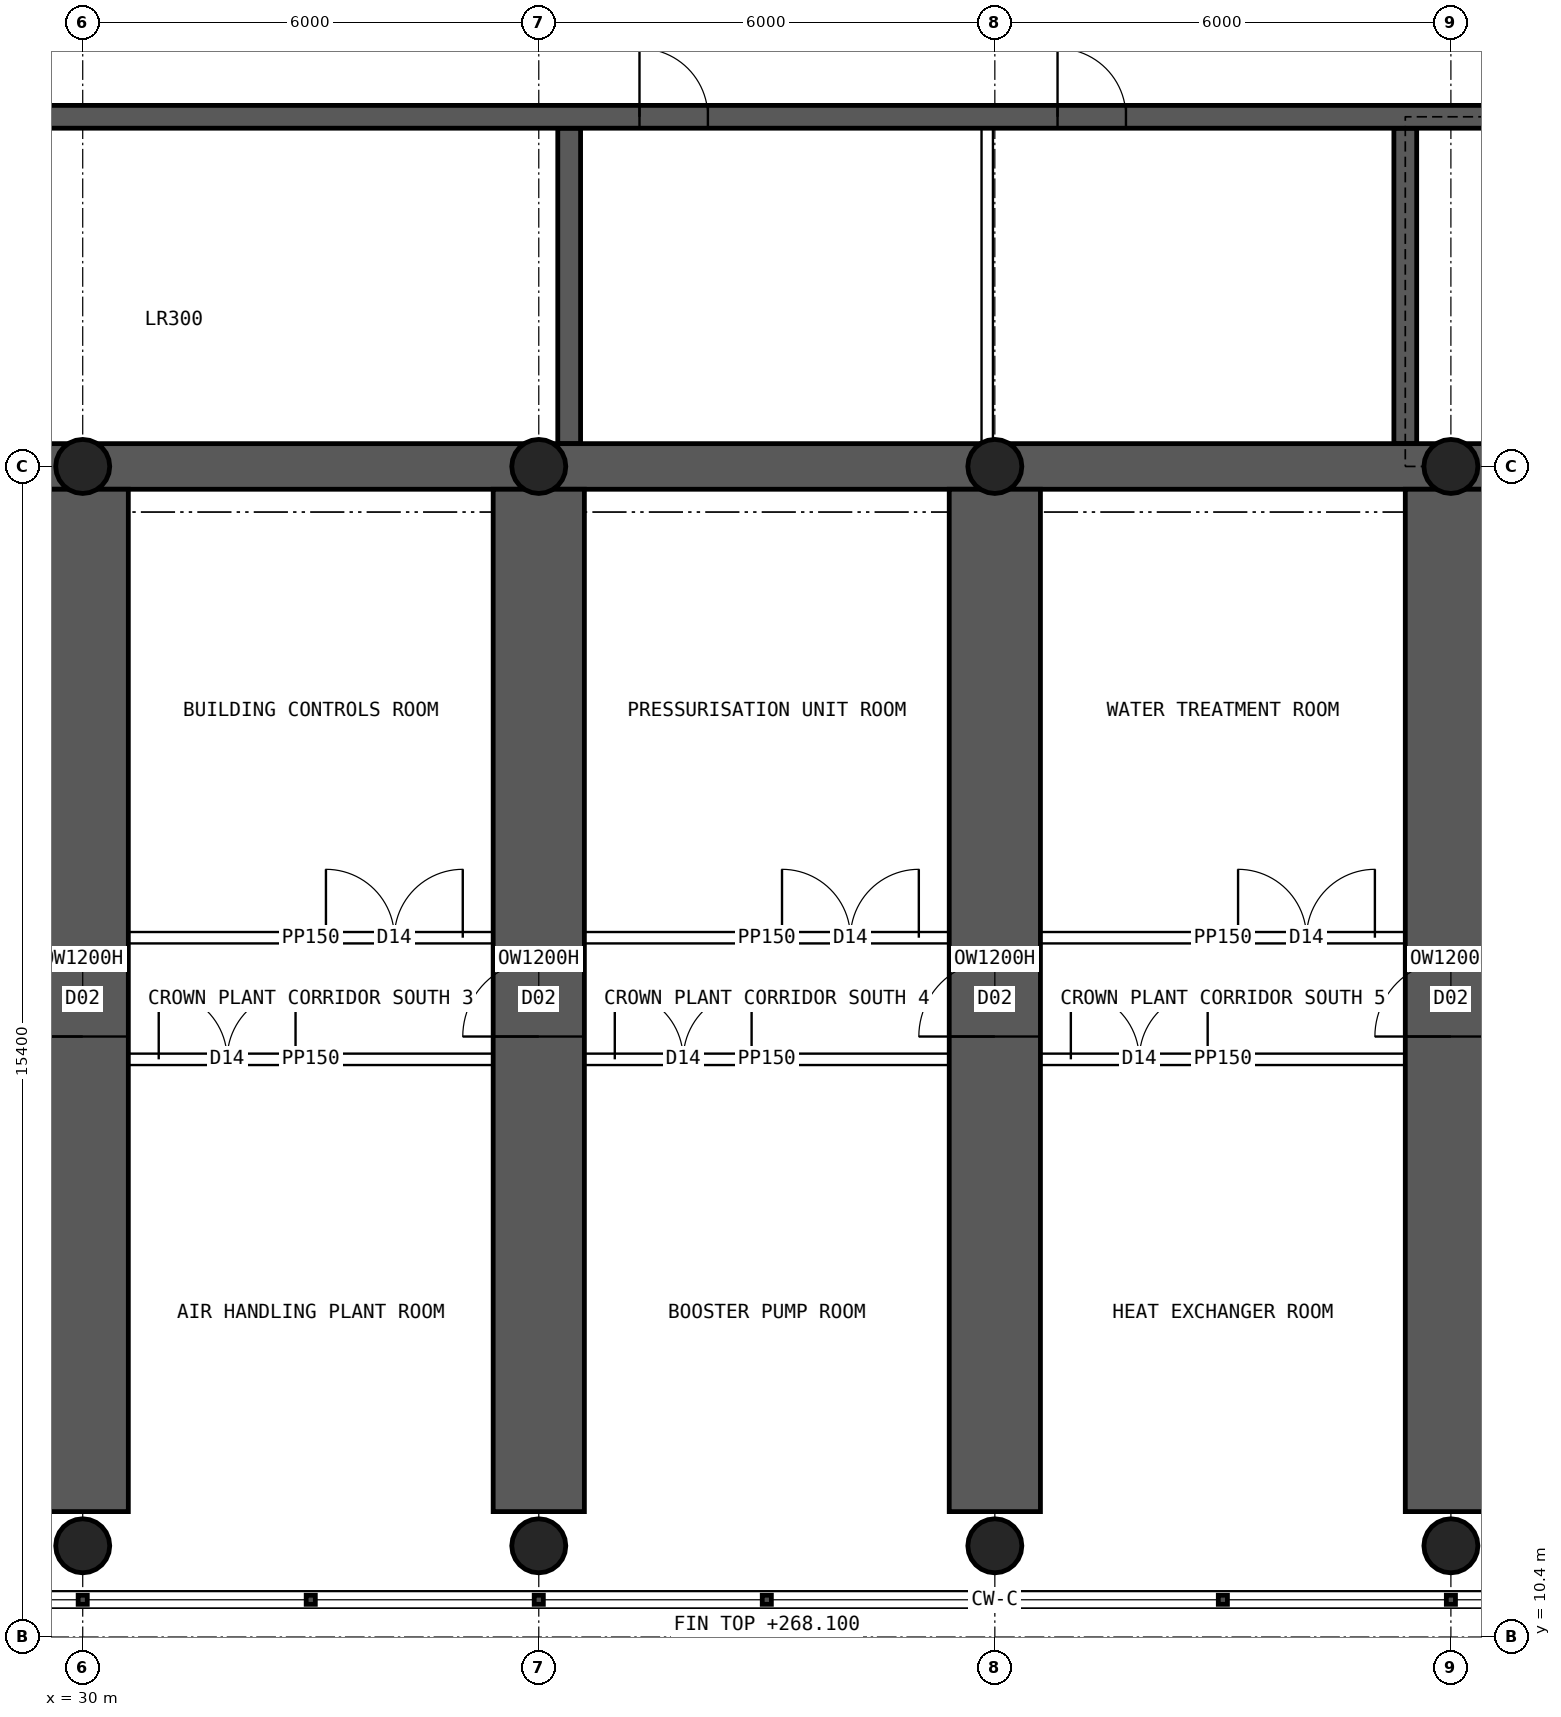
"""IFC4 building model, lengths in metres.
Left out: names, types, materials, properties, quantities, classifications, styles, units other than length and angle.
Written with IfcOpenShell. Run it as: python <this file> out.ifc"""

import sys

from ifc_helpers import new_model, si_unit, direction, frame, frame_2d, origin, origin_2d, place, context, subcontext, project, spatial, rectangle, hollow_circle, extrude, element, fill, save


model = new_model("IFC4")
c1 = context("Model", 3, precision=1e-05, world=origin(), true_north=direction((0.0, 1.0)))
c2 = subcontext(c1, "Body", "Model", "MODEL_VIEW")
j1 = project(units=[si_unit("LENGTHUNIT", "METRE"), si_unit("PLANEANGLEUNIT", "RADIAN")], contexts=[c1])
p1 = place(None, origin())
s1 = spatial("IfcSite", under=j1, at=p1, CompositionType="ELEMENT")
p2 = place(p1, origin())
s2 = spatial("IfcBuilding", under=s1, at=p2, CompositionType="ELEMENT")
p3 = place(p2, frame((0.0, 0.0, 262.3)))
s3 = spatial("IfcBuildingStorey", under=s2, at=p3, CompositionType="ELEMENT", Elevation=262.3)
p4 = place(p3, frame((18.0, 25.8, 0.0), z_axis=(0.0, 0.0, 1.0), x_axis=(1.0, 0.0, 0.0)))
e1 = element("IfcWall", 1, at=p4, inside=s3, PredefinedType="SHEAR", context=c2, shape_type="SweptSolid", body=[
    extrude(rectangle(XDim=48.0, YDim=0.6, at=frame_2d((24.0, 0.0))), origin(), (0.0, 0.0, 1.0), 6.0),
])
p5 = place(p3, frame((18.3, 30.4, 0.0), z_axis=(0.0, 0.0, 1.0), x_axis=(1.0, 0.0, 0.0)))
e2 = element("IfcWall", 2, at=p5, inside=s3, PredefinedType="SHEAR", context=c2, shape_type="SweptSolid", body=[
    extrude(rectangle(XDim=47.4, YDim=0.3, at=frame_2d((23.7, 0.0))), origin(), (0.0, 0.0, 1.0), 6.0),
])
p6 = place(p5, frame((0.4, 0.0, 0.0)))
e3 = element("IfcOpeningElement", 3, at=p6, cuts=e2, PredefinedType="OPENING", context=c2, shape_type="SweptSolid", body=[
    extrude(rectangle(XDim=1.0, YDim=2.1, at=frame_2d((0.5, 1.05))), frame((0.0, 0.16, 0.0), z_axis=(0.0, -1.0, 0.0), x_axis=(1.0, 0.0, 0.0)), (0.0, 0.0, 1.0), 0.32),
])
p7 = place(p5, frame((46.0, 0.0, 0.0)))
e4 = element("IfcOpeningElement", 4, at=p7, cuts=e2, PredefinedType="OPENING", context=c2, shape_type="SweptSolid", body=[
    extrude(rectangle(XDim=1.0, YDim=2.1, at=frame_2d((0.5, 1.05))), frame((0.0, 0.16, 0.0), z_axis=(0.0, -1.0, 0.0), x_axis=(1.0, 0.0, 0.0)), (0.0, 0.0, 1.0), 0.32),
])
p8 = place(p5, frame((19.025, 0.0, 0.0)))
e5 = element("IfcOpeningElement", 5, at=p8, cuts=e2, PredefinedType="OPENING", context=c2, shape_type="SweptSolid", body=[
    extrude(rectangle(XDim=0.9, YDim=2.1, at=frame_2d((0.45, 1.05))), frame((0.0, 0.16, 0.0), z_axis=(0.0, -1.0, 0.0), x_axis=(1.0, 0.0, 0.0)), (0.0, 0.0, 1.0), 0.32),
])
p9 = place(p5, frame((24.525, 0.0, 0.0)))
e6 = element("IfcOpeningElement", 6, at=p9, cuts=e2, PredefinedType="OPENING", context=c2, shape_type="SweptSolid", body=[
    extrude(rectangle(XDim=0.9, YDim=2.1, at=frame_2d((0.45, 1.05))), frame((0.0, 0.16, 0.0), z_axis=(0.0, -1.0, 0.0), x_axis=(1.0, 0.0, 0.0)), (0.0, 0.0, 1.0), 0.32),
])
p10 = place(p5, frame((30.317, 0.0, 0.0)))
e7 = element("IfcOpeningElement", 7, at=p10, cuts=e2, PredefinedType="OPENING", context=c2, shape_type="SweptSolid", body=[
    extrude(rectangle(XDim=1.1, YDim=2.1, at=frame_2d((0.55, 1.05))), frame((0.0, 0.16, 0.0), z_axis=(0.0, -1.0, 0.0), x_axis=(1.0, 0.0, 0.0)), (0.0, 0.0, 1.0), 0.32),
])
p11 = place(p5, frame((33.85, 0.0, 0.0)))
e8 = element("IfcOpeningElement", 8, at=p11, cuts=e2, PredefinedType="OPENING", context=c2, shape_type="SweptSolid", body=[
    extrude(rectangle(XDim=1.1, YDim=2.1, at=frame_2d((0.55, 1.05))), frame((0.0, 0.16, 0.0), z_axis=(0.0, -1.0, 0.0), x_axis=(1.0, 0.0, 0.0)), (0.0, 0.0, 1.0), 0.32),
])
p12 = place(p5, frame((37.383, 0.0, 0.0)))
e9 = element("IfcOpeningElement", 9, at=p12, cuts=e2, PredefinedType="OPENING", context=c2, shape_type="SweptSolid", body=[
    extrude(rectangle(XDim=1.1, YDim=2.1, at=frame_2d((0.55, 1.05))), frame((0.0, 0.16, 0.0), z_axis=(0.0, -1.0, 0.0), x_axis=(1.0, 0.0, 0.0)), (0.0, 0.0, 1.0), 0.32),
])
for number, where, z_axis, x_axis in (
    (10, (36.4, 26.1, 0.0), (0.0, 0.0, 1.0), (0.0, 1.0, 0.0)),
    (11, (47.4, 26.1, 0.0), (0.0, 0.0, 1.0), (0.0, 1.0, 0.0)),
):
    element("IfcWall", number, at=place(p3, frame(where, z_axis=z_axis, x_axis=x_axis)), inside=s3, PredefinedType="SHEAR", context=c2, shape_type="SweptSolid", body=[
        extrude(rectangle(XDim=4.15, YDim=0.3, at=frame_2d((2.075, 0.0))), origin(), (0.0, 0.0, 1.0), 6.0),
    ])
p13 = place(p3, frame((30.0, 12.05, 0.0), z_axis=(0.0, 0.0, 1.0), x_axis=(0.0, 1.0, 0.0)))
e12 = element("IfcWall", 12, at=p13, inside=s3, PredefinedType="SHEAR", context=c2, shape_type="SweptSolid", body=[
    extrude(rectangle(XDim=13.45, YDim=1.2, at=frame_2d((6.725, 0.0))), origin(), (0.0, 0.0, 1.0), 4.4),
])
p14 = place(p13, frame((6.25, 0.0, 0.0)))
e13 = element("IfcOpeningElement", 13, at=p14, cuts=e12, PredefinedType="OPENING", context=c2, shape_type="SweptSolid", body=[
    extrude(rectangle(XDim=1.0, YDim=2.1, at=frame_2d((0.5, 1.05))), frame((0.0, 0.61, 0.0), z_axis=(0.0, -1.0, 0.0), x_axis=(1.0, 0.0, 0.0)), (0.0, 0.0, 1.0), 1.22),
])
p15 = place(p3, frame((36.0, 12.05, 0.0), z_axis=(0.0, 0.0, 1.0), x_axis=(0.0, 1.0, 0.0)))
e14 = element("IfcWall", 14, at=p15, inside=s3, PredefinedType="SHEAR", context=c2, shape_type="SweptSolid", body=[
    extrude(rectangle(XDim=13.45, YDim=1.2, at=frame_2d((6.725, 0.0))), origin(), (0.0, 0.0, 1.0), 4.4),
])
p16 = place(p15, frame((6.25, 0.0, 0.0)))
e15 = element("IfcOpeningElement", 15, at=p16, cuts=e14, PredefinedType="OPENING", context=c2, shape_type="SweptSolid", body=[
    extrude(rectangle(XDim=1.0, YDim=2.1, at=frame_2d((0.5, 1.05))), frame((0.0, 0.61, 0.0), z_axis=(0.0, -1.0, 0.0), x_axis=(1.0, 0.0, 0.0)), (0.0, 0.0, 1.0), 1.22),
])
p17 = place(p3, frame((42.0, 12.05, 0.0), z_axis=(0.0, 0.0, 1.0), x_axis=(0.0, 1.0, 0.0)))
e16 = element("IfcWall", 16, at=p17, inside=s3, PredefinedType="SHEAR", context=c2, shape_type="SweptSolid", body=[
    extrude(rectangle(XDim=13.45, YDim=1.2, at=frame_2d((6.725, 0.0))), origin(), (0.0, 0.0, 1.0), 4.4),
])
p18 = place(p17, frame((6.25, 0.0, 0.0)))
e17 = element("IfcOpeningElement", 17, at=p18, cuts=e16, PredefinedType="OPENING", context=c2, shape_type="SweptSolid", body=[
    extrude(rectangle(XDim=1.0, YDim=2.1, at=frame_2d((0.5, 1.05))), frame((0.0, 0.61, 0.0), z_axis=(0.0, -1.0, 0.0), x_axis=(1.0, 0.0, 0.0)), (0.0, 0.0, 1.0), 1.22),
])
p19 = place(p3, frame((48.0, 12.05, 0.0), z_axis=(0.0, 0.0, 1.0), x_axis=(0.0, 1.0, 0.0)))
e18 = element("IfcWall", 18, at=p19, inside=s3, PredefinedType="SHEAR", context=c2, shape_type="SweptSolid", body=[
    extrude(rectangle(XDim=13.45, YDim=1.2, at=frame_2d((6.725, 0.0))), origin(), (0.0, 0.0, 1.0), 4.4),
])
p20 = place(p19, frame((6.25, 0.0, 0.0)))
e19 = element("IfcOpeningElement", 19, at=p20, cuts=e18, PredefinedType="OPENING", context=c2, shape_type="SweptSolid", body=[
    extrude(rectangle(XDim=1.0, YDim=2.1, at=frame_2d((0.5, 1.05))), frame((0.0, 0.61, 0.0), z_axis=(0.0, -1.0, 0.0), x_axis=(1.0, 0.0, 0.0)), (0.0, 0.0, 1.0), 1.22),
])
p21 = place(p3, frame((30.0, 11.6, 0.0), z_axis=(0.0, 0.0, 1.0), x_axis=(1.0, 0.0, 0.0)))
e20 = element("IfcColumn", 20, at=p21, inside=s3, PredefinedType="COLUMN", context=c2, shape_type="SweptSolid", body=[
    extrude(hollow_circle(Radius=0.355, WallThickness=0.025, at=origin_2d()), origin(), (0.0, 0.0, 1.0), 4.885),
])
p22 = place(p3, frame((30.0, 25.8, 0.0), z_axis=(0.0, 0.0, 1.0), x_axis=(1.0, 0.0, 0.0)))
e21 = element("IfcColumn", 21, at=p22, inside=s3, PredefinedType="COLUMN", context=c2, shape_type="SweptSolid", body=[
    extrude(hollow_circle(Radius=0.355, WallThickness=0.025, at=origin_2d()), origin(), (0.0, 0.0, 1.0), 8.426),
])
p23 = place(p3, frame((36.0, 11.6, 0.0), z_axis=(0.0, 0.0, 1.0), x_axis=(1.0, 0.0, 0.0)))
e22 = element("IfcColumn", 22, at=p23, inside=s3, PredefinedType="COLUMN", context=c2, shape_type="SweptSolid", body=[
    extrude(hollow_circle(Radius=0.355, WallThickness=0.025, at=origin_2d()), origin(), (0.0, 0.0, 1.0), 4.885),
])
p24 = place(p3, frame((36.0, 25.8, 0.0), z_axis=(0.0, 0.0, 1.0), x_axis=(1.0, 0.0, 0.0)))
e23 = element("IfcColumn", 23, at=p24, inside=s3, PredefinedType="COLUMN", context=c2, shape_type="SweptSolid", body=[
    extrude(hollow_circle(Radius=0.355, WallThickness=0.025, at=origin_2d()), origin(), (0.0, 0.0, 1.0), 8.426),
])
p25 = place(p3, frame((42.0, 11.6, 0.0), z_axis=(0.0, 0.0, 1.0), x_axis=(1.0, 0.0, 0.0)))
e24 = element("IfcColumn", 24, at=p25, inside=s3, PredefinedType="COLUMN", context=c2, shape_type="SweptSolid", body=[
    extrude(hollow_circle(Radius=0.355, WallThickness=0.025, at=origin_2d()), origin(), (0.0, 0.0, 1.0), 4.885),
])
p26 = place(p3, frame((42.0, 25.8, 0.0), z_axis=(0.0, 0.0, 1.0), x_axis=(1.0, 0.0, 0.0)))
e25 = element("IfcColumn", 25, at=p26, inside=s3, PredefinedType="COLUMN", context=c2, shape_type="SweptSolid", body=[
    extrude(hollow_circle(Radius=0.355, WallThickness=0.025, at=origin_2d()), origin(), (0.0, 0.0, 1.0), 8.426),
])
p27 = place(p3, frame((48.0, 11.6, 0.0), z_axis=(0.0, 0.0, 1.0), x_axis=(1.0, 0.0, 0.0)))
e26 = element("IfcColumn", 26, at=p27, inside=s3, PredefinedType="COLUMN", context=c2, shape_type="SweptSolid", body=[
    extrude(hollow_circle(Radius=0.355, WallThickness=0.025, at=origin_2d()), origin(), (0.0, 0.0, 1.0), 4.885),
])
p28 = place(p3, frame((48.0, 25.8, 0.0), z_axis=(0.0, 0.0, 1.0), x_axis=(1.0, 0.0, 0.0)))
e27 = element("IfcColumn", 27, at=p28, inside=s3, PredefinedType="COLUMN", context=c2, shape_type="SweptSolid", body=[
    extrude(hollow_circle(Radius=0.355, WallThickness=0.025, at=origin_2d()), origin(), (0.0, 0.0, 1.0), 8.426),
])
p29 = place(p3, frame((41.9, 26.1, 0.0), z_axis=(0.0, 0.0, 1.0), x_axis=(0.0, 1.0, 0.0)))
e28 = element("IfcWall", 28, at=p29, inside=s3, PredefinedType="SOLIDWALL", context=c2, shape_type="SweptSolid", body=[
    extrude(rectangle(XDim=4.15, YDim=0.15, at=frame_2d((2.075, 0.0))), origin(), (0.0, 0.0, 1.0), 6.0),
])
p30 = place(p3, frame((30.6, 18.0, 0.0), z_axis=(0.0, 0.0, 1.0), x_axis=(1.0, 0.0, 0.0)))
e29 = element("IfcWall", 29, at=p30, inside=s3, PredefinedType="PARTITIONING", context=c2, shape_type="SweptSolid", body=[
    extrude(rectangle(XDim=4.8, YDim=0.15, at=frame_2d((2.4, 0.0))), origin(), (0.0, 0.0, 1.0), 6.0),
])
p31 = place(p30, frame((0.4, 0.0, 0.0)))
e30 = element("IfcOpeningElement", 30, at=p31, cuts=e29, PredefinedType="OPENING", context=c2, shape_type="SweptSolid", body=[
    extrude(rectangle(XDim=1.8, YDim=2.4, at=frame_2d((0.9, 1.2))), frame((0.0, 0.085, 0.0), z_axis=(0.0, -1.0, 0.0), x_axis=(1.0, 0.0, 0.0)), (0.0, 0.0, 1.0), 0.17),
])
p32 = place(p3, frame((30.6, 19.6, 0.0), z_axis=(0.0, 0.0, 1.0), x_axis=(1.0, 0.0, 0.0)))
e31 = element("IfcWall", 31, at=p32, inside=s3, PredefinedType="PARTITIONING", context=c2, shape_type="SweptSolid", body=[
    extrude(rectangle(XDim=4.8, YDim=0.15, at=frame_2d((2.4, 0.0))), origin(), (0.0, 0.0, 1.0), 6.0),
])
p33 = place(p32, frame((2.6, 0.0, 0.0)))
e32 = element("IfcOpeningElement", 32, at=p33, cuts=e31, PredefinedType="OPENING", context=c2, shape_type="SweptSolid", body=[
    extrude(rectangle(XDim=1.8, YDim=2.4, at=frame_2d((0.9, 1.2))), frame((0.0, 0.085, 0.0), z_axis=(0.0, -1.0, 0.0), x_axis=(1.0, 0.0, 0.0)), (0.0, 0.0, 1.0), 0.17),
])
p34 = place(p3, frame((36.6, 18.0, 0.0), z_axis=(0.0, 0.0, 1.0), x_axis=(1.0, 0.0, 0.0)))
e33 = element("IfcWall", 33, at=p34, inside=s3, PredefinedType="PARTITIONING", context=c2, shape_type="SweptSolid", body=[
    extrude(rectangle(XDim=4.8, YDim=0.15, at=frame_2d((2.4, 0.0))), origin(), (0.0, 0.0, 1.0), 6.0),
])
p35 = place(p34, frame((0.4, 0.0, 0.0)))
e34 = element("IfcOpeningElement", 34, at=p35, cuts=e33, PredefinedType="OPENING", context=c2, shape_type="SweptSolid", body=[
    extrude(rectangle(XDim=1.8, YDim=2.4, at=frame_2d((0.9, 1.2))), frame((0.0, 0.085, 0.0), z_axis=(0.0, -1.0, 0.0), x_axis=(1.0, 0.0, 0.0)), (0.0, 0.0, 1.0), 0.17),
])
p36 = place(p3, frame((36.6, 19.6, 0.0), z_axis=(0.0, 0.0, 1.0), x_axis=(1.0, 0.0, 0.0)))
e35 = element("IfcWall", 35, at=p36, inside=s3, PredefinedType="PARTITIONING", context=c2, shape_type="SweptSolid", body=[
    extrude(rectangle(XDim=4.8, YDim=0.15, at=frame_2d((2.4, 0.0))), origin(), (0.0, 0.0, 1.0), 6.0),
])
p37 = place(p36, frame((2.6, 0.0, 0.0)))
e36 = element("IfcOpeningElement", 36, at=p37, cuts=e35, PredefinedType="OPENING", context=c2, shape_type="SweptSolid", body=[
    extrude(rectangle(XDim=1.8, YDim=2.4, at=frame_2d((0.9, 1.2))), frame((0.0, 0.085, 0.0), z_axis=(0.0, -1.0, 0.0), x_axis=(1.0, 0.0, 0.0)), (0.0, 0.0, 1.0), 0.17),
])
p38 = place(p3, frame((42.6, 18.0, 0.0), z_axis=(0.0, 0.0, 1.0), x_axis=(1.0, 0.0, 0.0)))
e37 = element("IfcWall", 37, at=p38, inside=s3, PredefinedType="PARTITIONING", context=c2, shape_type="SweptSolid", body=[
    extrude(rectangle(XDim=4.8, YDim=0.15, at=frame_2d((2.4, 0.0))), origin(), (0.0, 0.0, 1.0), 6.0),
])
p39 = place(p38, frame((0.4, 0.0, 0.0)))
e38 = element("IfcOpeningElement", 38, at=p39, cuts=e37, PredefinedType="OPENING", context=c2, shape_type="SweptSolid", body=[
    extrude(rectangle(XDim=1.8, YDim=2.4, at=frame_2d((0.9, 1.2))), frame((0.0, 0.085, 0.0), z_axis=(0.0, -1.0, 0.0), x_axis=(1.0, 0.0, 0.0)), (0.0, 0.0, 1.0), 0.17),
])
p40 = place(p3, frame((42.6, 19.6, 0.0), z_axis=(0.0, 0.0, 1.0), x_axis=(1.0, 0.0, 0.0)))
e39 = element("IfcWall", 39, at=p40, inside=s3, PredefinedType="PARTITIONING", context=c2, shape_type="SweptSolid", body=[
    extrude(rectangle(XDim=4.8, YDim=0.15, at=frame_2d((2.4, 0.0))), origin(), (0.0, 0.0, 1.0), 6.0),
])
p41 = place(p40, frame((2.6, 0.0, 0.0)))
e40 = element("IfcOpeningElement", 40, at=p41, cuts=e39, PredefinedType="OPENING", context=c2, shape_type="SweptSolid", body=[
    extrude(rectangle(XDim=1.8, YDim=2.4, at=frame_2d((0.9, 1.2))), frame((0.0, 0.085, 0.0), z_axis=(0.0, -1.0, 0.0), x_axis=(1.0, 0.0, 0.0)), (0.0, 0.0, 1.0), 0.17),
])
p42 = place(p8, origin())
e41 = element("IfcDoor", 41, at=p42, inside=s3, OperationType="SINGLE_SWING_LEFT", PredefinedType="DOOR", context=c2, shape_type="SweptSolid", body=[
    extrude(rectangle(XDim=0.9, YDim=2.1, at=frame_2d((0.45, 1.05))), frame((0.0, 0.025, 0.0), z_axis=(0.0, -1.0, 0.0), x_axis=(1.0, 0.0, 0.0)), (0.0, 0.0, 1.0), 0.05),
])
fill(e5, e41)
p43 = place(p9, origin())
e42 = element("IfcDoor", 42, at=p43, inside=s3, OperationType="SINGLE_SWING_LEFT", PredefinedType="DOOR", context=c2, shape_type="SweptSolid", body=[
    extrude(rectangle(XDim=0.9, YDim=2.1, at=frame_2d((0.45, 1.05))), frame((0.0, 0.025, 0.0), z_axis=(0.0, -1.0, 0.0), x_axis=(1.0, 0.0, 0.0)), (0.0, 0.0, 1.0), 0.05),
])
fill(e6, e42)
p44 = place(p14, origin())
e43 = element("IfcDoor", 43, at=p44, inside=s3, OperationType="SINGLE_SWING_LEFT", PredefinedType="DOOR", context=c2, shape_type="SweptSolid", body=[
    extrude(rectangle(XDim=1.0, YDim=2.1, at=frame_2d((0.5, 1.05))), frame((0.0, 0.025, 0.0), z_axis=(0.0, -1.0, 0.0), x_axis=(1.0, 0.0, 0.0)), (0.0, 0.0, 1.0), 0.05),
])
fill(e13, e43)
p45 = place(p16, origin())
e44 = element("IfcDoor", 44, at=p45, inside=s3, OperationType="SINGLE_SWING_LEFT", PredefinedType="DOOR", context=c2, shape_type="SweptSolid", body=[
    extrude(rectangle(XDim=1.0, YDim=2.1, at=frame_2d((0.5, 1.05))), frame((0.0, 0.025, 0.0), z_axis=(0.0, -1.0, 0.0), x_axis=(1.0, 0.0, 0.0)), (0.0, 0.0, 1.0), 0.05),
])
fill(e15, e44)
p46 = place(p18, origin())
e45 = element("IfcDoor", 45, at=p46, inside=s3, OperationType="SINGLE_SWING_LEFT", PredefinedType="DOOR", context=c2, shape_type="SweptSolid", body=[
    extrude(rectangle(XDim=1.0, YDim=2.1, at=frame_2d((0.5, 1.05))), frame((0.0, 0.025, 0.0), z_axis=(0.0, -1.0, 0.0), x_axis=(1.0, 0.0, 0.0)), (0.0, 0.0, 1.0), 0.05),
])
fill(e17, e45)
p47 = place(p20, origin())
e46 = element("IfcDoor", 46, at=p47, inside=s3, OperationType="SINGLE_SWING_LEFT", PredefinedType="DOOR", context=c2, shape_type="SweptSolid", body=[
    extrude(rectangle(XDim=1.0, YDim=2.1, at=frame_2d((0.5, 1.05))), frame((0.0, 0.025, 0.0), z_axis=(0.0, -1.0, 0.0), x_axis=(1.0, 0.0, 0.0)), (0.0, 0.0, 1.0), 0.05),
])
fill(e19, e46)
p48 = place(p31, origin())
e47 = element("IfcDoor", 47, at=p48, inside=s3, OperationType="DOUBLE_DOOR_SINGLE_SWING", PredefinedType="DOOR", context=c2, shape_type="SweptSolid", body=[
    extrude(rectangle(XDim=1.8, YDim=2.4, at=frame_2d((0.9, 1.2))), frame((0.0, 0.025, 0.0), z_axis=(0.0, -1.0, 0.0), x_axis=(1.0, 0.0, 0.0)), (0.0, 0.0, 1.0), 0.05),
])
fill(e30, e47)
p49 = place(p33, origin())
e48 = element("IfcDoor", 48, at=p49, inside=s3, OperationType="DOUBLE_DOOR_SINGLE_SWING", PredefinedType="DOOR", context=c2, shape_type="SweptSolid", body=[
    extrude(rectangle(XDim=1.8, YDim=2.4, at=frame_2d((0.9, 1.2))), frame((0.0, 0.025, 0.0), z_axis=(0.0, -1.0, 0.0), x_axis=(1.0, 0.0, 0.0)), (0.0, 0.0, 1.0), 0.05),
])
fill(e32, e48)
p50 = place(p35, origin())
e49 = element("IfcDoor", 49, at=p50, inside=s3, OperationType="DOUBLE_DOOR_SINGLE_SWING", PredefinedType="DOOR", context=c2, shape_type="SweptSolid", body=[
    extrude(rectangle(XDim=1.8, YDim=2.4, at=frame_2d((0.9, 1.2))), frame((0.0, 0.025, 0.0), z_axis=(0.0, -1.0, 0.0), x_axis=(1.0, 0.0, 0.0)), (0.0, 0.0, 1.0), 0.05),
])
fill(e34, e49)
p51 = place(p37, origin())
e50 = element("IfcDoor", 50, at=p51, inside=s3, OperationType="DOUBLE_DOOR_SINGLE_SWING", PredefinedType="DOOR", context=c2, shape_type="SweptSolid", body=[
    extrude(rectangle(XDim=1.8, YDim=2.4, at=frame_2d((0.9, 1.2))), frame((0.0, 0.025, 0.0), z_axis=(0.0, -1.0, 0.0), x_axis=(1.0, 0.0, 0.0)), (0.0, 0.0, 1.0), 0.05),
])
fill(e36, e50)
p52 = place(p39, origin())
e51 = element("IfcDoor", 51, at=p52, inside=s3, OperationType="DOUBLE_DOOR_SINGLE_SWING", PredefinedType="DOOR", context=c2, shape_type="SweptSolid", body=[
    extrude(rectangle(XDim=1.8, YDim=2.4, at=frame_2d((0.9, 1.2))), frame((0.0, 0.025, 0.0), z_axis=(0.0, -1.0, 0.0), x_axis=(1.0, 0.0, 0.0)), (0.0, 0.0, 1.0), 0.05),
])
fill(e38, e51)
p53 = place(p41, origin())
e52 = element("IfcDoor", 52, at=p53, inside=s3, OperationType="DOUBLE_DOOR_SINGLE_SWING", PredefinedType="DOOR", context=c2, shape_type="SweptSolid", body=[
    extrude(rectangle(XDim=1.8, YDim=2.4, at=frame_2d((0.9, 1.2))), frame((0.0, 0.025, 0.0), z_axis=(0.0, -1.0, 0.0), x_axis=(1.0, 0.0, 0.0)), (0.0, 0.0, 1.0), 0.05),
])
fill(e40, e52)
save(model, sys.argv[1])
